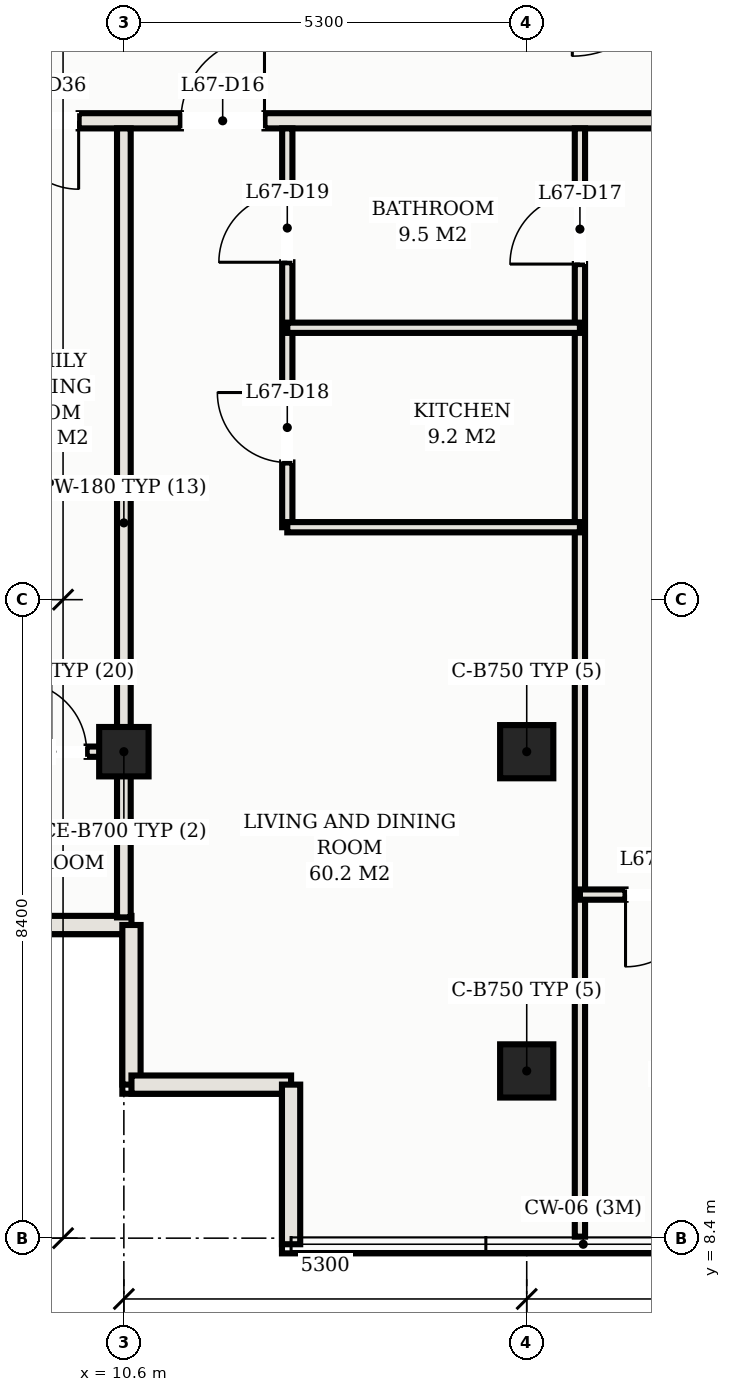
"""IFC4 building model, lengths in metres.
Left out: names, types, materials, properties, quantities, classifications, styles, units other than length and angle.
Written with IfcOpenShell. Run it as: python <this file> out.ifc"""

import sys

from ifc_helpers import new_model, si_unit, direction, frame, frame_2d, origin, origin_2d, place, context, subcontext, project, spatial, rectangle, hollow_rectangle, extrude, element, fill, save


model = new_model("IFC4")
c1 = context("Model", 3, precision=1e-05, world=origin(), true_north=direction((0.0, 1.0)))
c2 = subcontext(c1, "Body", "Model", "MODEL_VIEW")
j1 = project(units=[si_unit("LENGTHUNIT", "METRE"), si_unit("PLANEANGLEUNIT", "RADIAN")], contexts=[c1])
p1 = place(None, origin())
s1 = spatial("IfcSite", under=j1, at=p1, CompositionType="ELEMENT")
p2 = place(p1, origin())
s2 = spatial("IfcBuilding", under=s1, at=p2, CompositionType="ELEMENT")
p3 = place(p2, frame((0.0, 0.0, 242.9)))
s3 = spatial("IfcBuildingStorey", under=s2, at=p3, CompositionType="ELEMENT", Elevation=242.9)
for number, where, z_axis, x_axis in (
    (1, (15.9, 14.8, 0.0), (0.0, 0.0, 1.0), (1.0, 0.0, 0.0)),
    (2, (15.9, 10.6, 0.0), (0.0, 0.0, 1.0), (1.0, 0.0, 0.0)),
):
    element("IfcColumn", number, at=place(p3, frame(where, z_axis=z_axis, x_axis=x_axis)), inside=s3, PredefinedType="COLUMN", context=c2, shape_type="SweptSolid", body=[
        extrude(hollow_rectangle(XDim=0.7, YDim=0.7, WallThickness=0.025, at=origin_2d()), origin(), (0.0, 0.0, 1.0), 3.3),
    ])
p4 = place(p3, frame((10.6, 14.8, 0.0), z_axis=(0.0, 0.0, 1.0), x_axis=(1.0, 0.0, 0.0)))
e3 = element("IfcColumn", 3, at=p4, inside=s3, PredefinedType="COLUMN", context=c2, shape_type="SweptSolid", body=[
    extrude(hollow_rectangle(XDim=0.65, YDim=0.65, WallThickness=0.022, at=origin_2d()), origin(), (0.0, 0.0, 1.0), 3.3),
])
p5 = place(p3, frame((8.6, 12.52, 0.0), z_axis=(0.0, 0.0, 1.0), x_axis=(1.0, 0.0, 0.0)))
e4 = element("IfcWall", 4, at=p5, inside=s3, PredefinedType="SOLIDWALL", context=c2, shape_type="SweptSolid", body=[
    extrude(rectangle(XDim=2.1, YDim=0.24, at=frame_2d((1.05, 0.0))), origin(), (0.0, 0.0, 1.0), 3.11),
])
for number, where, z_axis, x_axis in (
    (5, (10.7, 12.52, 0.0), (0.0, 0.0, 1.0), (0.0, -1.0, 0.0)),
    (6, (10.7, 10.42, 0.0), (0.0, 0.0, 1.0), (1.0, 0.0, 0.0)),
):
    element("IfcWall", number, at=place(p3, frame(where, z_axis=z_axis, x_axis=x_axis)), inside=s3, PredefinedType="SOLIDWALL", context=c2, shape_type="SweptSolid", body=[
        extrude(rectangle(XDim=2.1, YDim=0.24, at=frame_2d((1.05, 0.0))), origin(), (0.0, 0.0, 1.0), 3.11),
    ])
p6 = place(p3, frame((12.8, 10.42, 0.0), z_axis=(0.0, 0.0, 1.0), x_axis=(0.0, -1.0, 0.0)))
e7 = element("IfcWall", 7, at=p6, inside=s3, PredefinedType="SOLIDWALL", context=c2, shape_type="SweptSolid", body=[
    extrude(rectangle(XDim=2.1, YDim=0.24, at=frame_2d((1.05, 0.0))), origin(), (0.0, 0.0, 1.0), 3.11),
])
p7 = place(p3, frame((8.6, 23.1, 0.0), z_axis=(0.0, 0.0, 1.0), x_axis=(1.0, 0.0, 0.0)))
e8 = element("IfcWall", 8, at=p7, inside=s3, PredefinedType="PARTITIONING", context=c2, shape_type="SweptSolid", body=[
    extrude(rectangle(XDim=35.8, YDim=0.2, at=frame_2d((17.9, 0.0))), origin(), (0.0, 0.0, 1.0), 2.45),
])
p8 = place(p7, frame((2.75, 0.0, 0.0)))
e9 = element("IfcOpeningElement", 9, at=p8, cuts=e8, PredefinedType="OPENING", context=c2, shape_type="SweptSolid", body=[
    extrude(rectangle(XDim=1.1, YDim=2.25, at=frame_2d((0.55, 1.125))), frame((0.0, 0.11, 0.0), z_axis=(0.0, -1.0, 0.0), x_axis=(1.0, 0.0, 0.0)), (0.0, 0.0, 1.0), 0.22),
])
p9 = place(p7, frame((13.35, 0.0, 0.0)))
e10 = element("IfcOpeningElement", 10, at=p9, cuts=e8, PredefinedType="OPENING", context=c2, shape_type="SweptSolid", body=[
    extrude(rectangle(XDim=1.1, YDim=2.25, at=frame_2d((0.55, 1.125))), frame((0.0, 0.11, 0.0), z_axis=(0.0, -1.0, 0.0), x_axis=(1.0, 0.0, 0.0)), (0.0, 0.0, 1.0), 0.22),
])
p10 = place(p7, frame((23.95, 0.0, 0.0)))
e11 = element("IfcOpeningElement", 11, at=p10, cuts=e8, PredefinedType="OPENING", context=c2, shape_type="SweptSolid", body=[
    extrude(rectangle(XDim=1.1, YDim=2.25, at=frame_2d((0.55, 1.125))), frame((0.0, 0.11, 0.0), z_axis=(0.0, -1.0, 0.0), x_axis=(1.0, 0.0, 0.0)), (0.0, 0.0, 1.0), 0.22),
])
p11 = place(p7, frame((29.25, 0.0, 0.0)))
e12 = element("IfcOpeningElement", 12, at=p11, cuts=e8, PredefinedType="OPENING", context=c2, shape_type="SweptSolid", body=[
    extrude(rectangle(XDim=1.1, YDim=2.25, at=frame_2d((0.55, 1.125))), frame((0.0, 0.11, 0.0), z_axis=(0.0, -1.0, 0.0), x_axis=(1.0, 0.0, 0.0)), (0.0, 0.0, 1.0), 0.22),
])
p12 = place(p7, frame((0.505, 0.0, 0.0)))
e13 = element("IfcOpeningElement", 13, at=p12, cuts=e8, PredefinedType="OPENING", context=c2, shape_type="SweptSolid", body=[
    extrude(rectangle(XDim=0.9, YDim=2.15, at=frame_2d((0.45, 1.075))), frame((0.0, 0.11, 0.0), z_axis=(0.0, -1.0, 0.0), x_axis=(1.0, 0.0, 0.0)), (0.0, 0.0, 1.0), 0.22),
])
p13 = place(p7, frame((34.395, 0.0, 0.0)))
e14 = element("IfcOpeningElement", 14, at=p13, cuts=e8, PredefinedType="OPENING", context=c2, shape_type="SweptSolid", body=[
    extrude(rectangle(XDim=0.9, YDim=2.15, at=frame_2d((0.45, 1.075))), frame((0.0, 0.11, 0.0), z_axis=(0.0, -1.0, 0.0), x_axis=(1.0, 0.0, 0.0)), (0.0, 0.0, 1.0), 0.22),
])
p14 = place(p3, frame((10.6, 12.62, 0.0), z_axis=(0.0, 0.0, 1.0), x_axis=(0.0, 1.0, 0.0)))
e15 = element("IfcWall", 15, at=p14, inside=s3, PredefinedType="PARTITIONING", context=c2, shape_type="SweptSolid", body=[
    extrude(rectangle(XDim=10.38, YDim=0.18, at=frame_2d((5.19, 0.0))), origin(), (0.0, 0.0, 1.0), 2.45),
])
p15 = place(p3, frame((16.6, 8.42, 0.0), z_axis=(0.0, 0.0, 1.0), x_axis=(0.0, 1.0, 0.0)))
e16 = element("IfcWall", 16, at=p15, inside=s3, PredefinedType="PARTITIONING", context=c2, shape_type="SweptSolid", body=[
    extrude(rectangle(XDim=14.58, YDim=0.135, at=frame_2d((7.29, 0.0))), origin(), (0.0, 0.0, 1.0), 2.45),
])
p16 = place(p15, frame((12.795, 0.0, 0.0)))
e17 = element("IfcOpeningElement", 17, at=p16, cuts=e16, PredefinedType="OPENING", context=c2, shape_type="SweptSolid", body=[
    extrude(rectangle(XDim=0.92, YDim=2.15, at=frame_2d((0.46, 1.075))), frame((0.0, 0.078, 0.0), z_axis=(0.0, -1.0, 0.0), x_axis=(1.0, 0.0, 0.0)), (0.0, 0.0, 1.0), 0.155),
])
p17 = place(p3, frame((12.75, 17.753, 0.0), z_axis=(0.0, 0.0, 1.0), x_axis=(0.0, 1.0, 0.0)))
e18 = element("IfcWall", 18, at=p17, inside=s3, PredefinedType="PARTITIONING", context=c2, shape_type="SweptSolid", body=[
    extrude(rectangle(XDim=5.247, YDim=0.135, at=frame_2d((2.624, 0.0))), origin(), (0.0, 0.0, 1.0), 2.45),
])
p18 = place(p17, frame((0.852, 0.0, 0.0)))
e19 = element("IfcOpeningElement", 19, at=p18, cuts=e18, PredefinedType="OPENING", context=c2, shape_type="SweptSolid", body=[
    extrude(rectangle(XDim=0.92, YDim=2.15, at=frame_2d((0.46, 1.075))), frame((0.0, 0.078, 0.0), z_axis=(0.0, -1.0, 0.0), x_axis=(1.0, 0.0, 0.0)), (0.0, 0.0, 1.0), 0.155),
])
p19 = place(p17, frame((3.486, 0.0, 0.0)))
e20 = element("IfcOpeningElement", 20, at=p19, cuts=e18, PredefinedType="OPENING", context=c2, shape_type="SweptSolid", body=[
    extrude(rectangle(XDim=0.9, YDim=2.15, at=frame_2d((0.45, 1.075))), frame((0.0, 0.078, 0.0), z_axis=(0.0, -1.0, 0.0), x_axis=(1.0, 0.0, 0.0)), (0.0, 0.0, 1.0), 0.155),
])
for number, where, z_axis, x_axis in (
    (21, (12.75, 17.753, 0.0), (0.0, 0.0, 1.0), (1.0, 0.0, 0.0)),
    (22, (12.75, 20.377, 0.0), (0.0, 0.0, 1.0), (1.0, 0.0, 0.0)),
):
    element("IfcWall", number, at=place(p3, frame(where, z_axis=z_axis, x_axis=x_axis)), inside=s3, PredefinedType="PARTITIONING", context=c2, shape_type="SweptSolid", body=[
        extrude(rectangle(XDim=3.85, YDim=0.135, at=frame_2d((1.925, 0.0))), origin(), (0.0, 0.0, 1.0), 2.45),
    ])
p20 = place(p3, frame((16.6, 12.92, 0.0), z_axis=(0.0, 0.0, 1.0), x_axis=(1.0, 0.0, 0.0)))
e23 = element("IfcWall", 23, at=p20, inside=s3, PredefinedType="PARTITIONING", context=c2, shape_type="SweptSolid", body=[
    extrude(rectangle(XDim=4.6, YDim=0.135, at=frame_2d((2.3, 0.0))), origin(), (0.0, 0.0, 1.0), 2.45),
])
p21 = place(p20, frame((0.6, 0.0, 0.0)))
e24 = element("IfcOpeningElement", 24, at=p21, cuts=e23, PredefinedType="OPENING", context=c2, shape_type="SweptSolid", body=[
    extrude(rectangle(XDim=0.95, YDim=2.15, at=frame_2d((0.475, 1.075))), frame((0.0, 0.078, 0.0), z_axis=(0.0, -1.0, 0.0), x_axis=(1.0, 0.0, 0.0)), (0.0, 0.0, 1.0), 0.155),
])
p22 = place(p20, frame((2.925, 0.0, 0.0)))
e25 = element("IfcOpeningElement", 25, at=p22, cuts=e23, PredefinedType="OPENING", context=c2, shape_type="SweptSolid", body=[
    extrude(rectangle(XDim=0.9, YDim=2.15, at=frame_2d((0.45, 1.075))), frame((0.0, 0.078, 0.0), z_axis=(0.0, -1.0, 0.0), x_axis=(1.0, 0.0, 0.0)), (0.0, 0.0, 1.0), 0.155),
])
p23 = place(p3, frame((8.7, 14.8, 0.0), z_axis=(0.0, 0.0, 1.0), x_axis=(1.0, 0.0, 0.0)))
e26 = element("IfcWall", 26, at=p23, inside=s3, PredefinedType="PARTITIONING", context=c2, shape_type="SweptSolid", body=[
    extrude(rectangle(XDim=1.9, YDim=0.135, at=frame_2d((0.95, 0.0))), origin(), (0.0, 0.0, 1.0), 2.45),
])
p24 = place(p23, frame((0.49, 0.0, 0.0)))
e27 = element("IfcOpeningElement", 27, at=p24, cuts=e26, PredefinedType="OPENING", context=c2, shape_type="SweptSolid", body=[
    extrude(rectangle(XDim=0.92, YDim=2.15, at=frame_2d((0.46, 1.075))), frame((0.0, 0.078, 0.0), z_axis=(0.0, -1.0, 0.0), x_axis=(1.0, 0.0, 0.0)), (0.0, 0.0, 1.0), 0.155),
])
p25 = place(p8, origin())
e28 = element("IfcDoor", 28, at=p25, inside=s3, OperationType="SINGLE_SWING_RIGHT", PredefinedType="DOOR", context=c2, shape_type="SweptSolid", body=[
    extrude(rectangle(XDim=1.1, YDim=2.25, at=frame_2d((0.55, 1.125))), frame((0.0, 0.025, 0.0), z_axis=(0.0, -1.0, 0.0), x_axis=(1.0, 0.0, 0.0)), (0.0, 0.0, 1.0), 0.05),
])
fill(e9, e28)
p26 = place(p16, origin())
e29 = element("IfcDoor", 29, at=p26, inside=s3, OperationType="SINGLE_SWING_LEFT", PredefinedType="DOOR", context=c2, shape_type="SweptSolid", body=[
    extrude(rectangle(XDim=0.92, YDim=2.15, at=frame_2d((0.46, 1.075))), frame((0.0, 0.025, 0.0), z_axis=(0.0, -1.0, 0.0), x_axis=(1.0, 0.0, 0.0)), (0.0, 0.0, 1.0), 0.05),
])
fill(e17, e29)
p27 = place(p18, origin())
e30 = element("IfcDoor", 30, at=p27, inside=s3, OperationType="SINGLE_SWING_RIGHT", PredefinedType="DOOR", context=c2, shape_type="SweptSolid", body=[
    extrude(rectangle(XDim=0.92, YDim=2.15, at=frame_2d((0.46, 1.075))), frame((0.0, 0.025, 0.0), z_axis=(0.0, -1.0, 0.0), x_axis=(1.0, 0.0, 0.0)), (0.0, 0.0, 1.0), 0.05),
])
fill(e19, e30)
p28 = place(p19, origin())
e31 = element("IfcDoor", 31, at=p28, inside=s3, OperationType="SINGLE_SWING_LEFT", PredefinedType="DOOR", context=c2, shape_type="SweptSolid", body=[
    extrude(rectangle(XDim=0.9, YDim=2.15, at=frame_2d((0.45, 1.075))), frame((0.0, 0.025, 0.0), z_axis=(0.0, -1.0, 0.0), x_axis=(1.0, 0.0, 0.0)), (0.0, 0.0, 1.0), 0.05),
])
fill(e20, e31)
p29 = place(p21, frame((0.95, 0.0, 0.0), z_axis=(0.0, 0.0, 1.0), x_axis=(-1.0, 0.0, 0.0)))
e32 = element("IfcDoor", 32, at=p29, inside=s3, OperationType="SINGLE_SWING_RIGHT", PredefinedType="DOOR", context=c2, shape_type="SweptSolid", body=[
    extrude(rectangle(XDim=0.95, YDim=2.15, at=frame_2d((0.475, 1.075))), frame((0.0, 0.025, 0.0), z_axis=(0.0, -1.0, 0.0), x_axis=(1.0, 0.0, 0.0)), (0.0, 0.0, 1.0), 0.05),
])
fill(e24, e32)
p30 = place(p24, origin())
e33 = element("IfcDoor", 33, at=p30, inside=s3, OperationType="SINGLE_SWING_LEFT", PredefinedType="DOOR", context=c2, shape_type="SweptSolid", body=[
    extrude(rectangle(XDim=0.92, YDim=2.15, at=frame_2d((0.46, 1.075))), frame((0.0, 0.025, 0.0), z_axis=(0.0, -1.0, 0.0), x_axis=(1.0, 0.0, 0.0)), (0.0, 0.0, 1.0), 0.05),
])
fill(e27, e33)
p31 = place(p12, frame((0.9, 0.0, 0.0), z_axis=(0.0, 0.0, 1.0), x_axis=(-1.0, 0.0, 0.0)))
e34 = element("IfcDoor", 34, at=p31, inside=s3, OperationType="SINGLE_SWING_LEFT", PredefinedType="DOOR", context=c2, shape_type="SweptSolid", body=[
    extrude(rectangle(XDim=0.9, YDim=2.15, at=frame_2d((0.45, 1.075))), frame((0.0, 0.025, 0.0), z_axis=(0.0, -1.0, 0.0), x_axis=(1.0, 0.0, 0.0)), (0.0, 0.0, 1.0), 0.05),
])
fill(e13, e34)
save(model, sys.argv[1])
